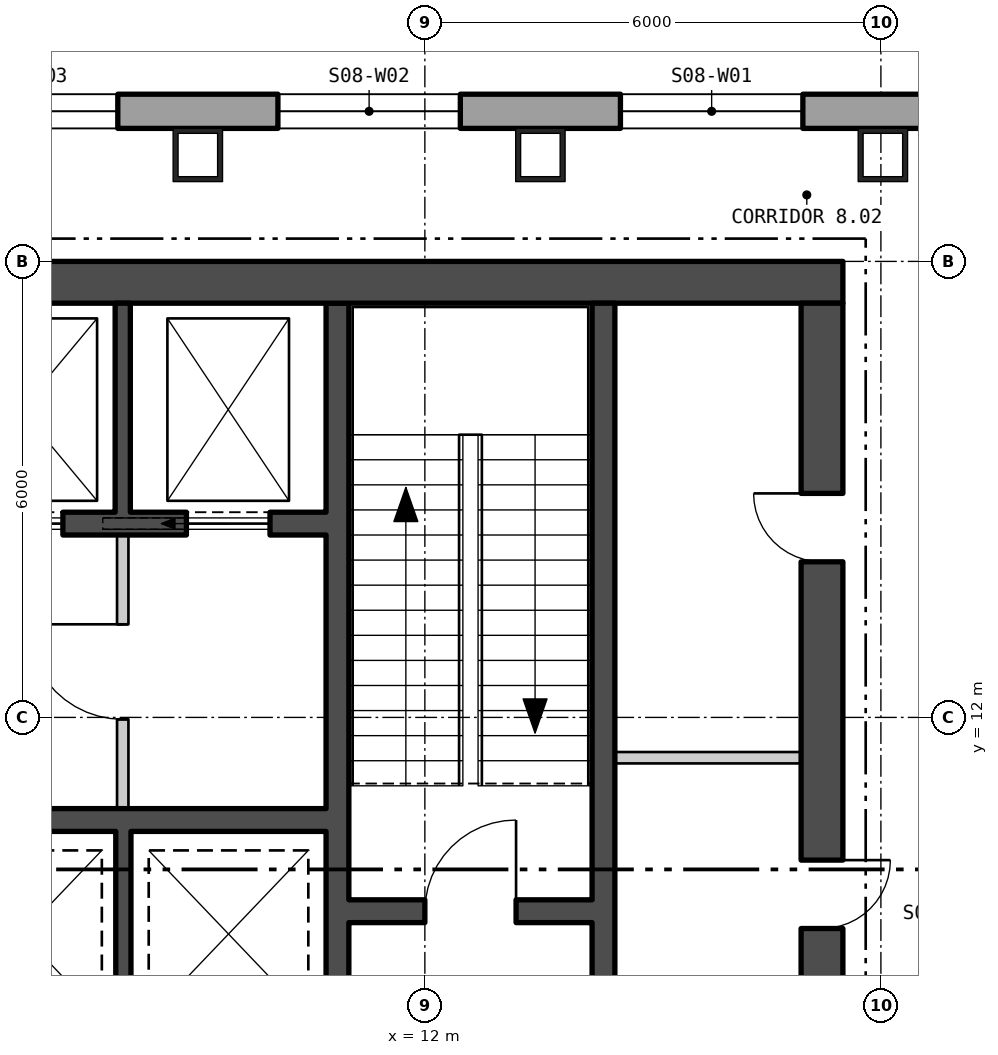
"""IFC4 building model, lengths in metres.
Left out: names, types, materials, properties, quantities, classifications, styles, units other than length and angle.
Written with IfcOpenShell. Run it as: python <this file> out.ifc"""

import sys

from ifc_helpers import new_model, si_unit, direction, frame, frame_2d, origin, origin_2d, place, context, subcontext, project, spatial, polyline, rectangle, hollow_rectangle, outline, extrude, element, fill, save


model = new_model("IFC4")
c1 = context("Model", 3, precision=1e-05, world=origin(), true_north=direction((0.0, 1.0)))
c2 = subcontext(c1, "Body", "Model", "MODEL_VIEW")
j1 = project(units=[si_unit("LENGTHUNIT", "METRE"), si_unit("PLANEANGLEUNIT", "RADIAN")], contexts=[c1])
p1 = place(None, origin())
s1 = spatial("IfcSite", under=j1, at=p1, CompositionType="ELEMENT")
p2 = place(p1, origin())
s2 = spatial("IfcBuilding", under=s1, at=p2, CompositionType="ELEMENT")
p3 = place(p2, frame((0.0, 0.0, 111.3)))
s3 = spatial("IfcBuildingStorey", under=s2, at=p3, CompositionType="ELEMENT", Elevation=111.3)
for number, where, z_axis, x_axis in (
    (1, (18.026, 19.4, 0.0), (0.0, 0.0, 1.0), (-1.0, 0.0, 0.0)),
    (2, (13.52, 19.4, 0.0), (0.0, 0.0, 1.0), (-1.0, 0.0, 0.0)),
    (3, (9.013, 19.4, 0.0), (0.0, 0.0, 1.0), (-1.0, 0.0, 0.0)),
):
    element("IfcColumn", number, at=place(p3, frame(where, z_axis=z_axis, x_axis=x_axis)), inside=s3, PredefinedType="COLUMN", context=c2, shape_type="SweptSolid", body=[
        extrude(hollow_rectangle(XDim=0.65, YDim=0.7, WallThickness=0.065, at=origin_2d()), origin(), (0.0, 0.0, 1.0), 4.5),
    ])
p4 = place(p3, frame((22.865, 19.975, -0.4), z_axis=(0.0, 0.0, 1.0), x_axis=(-1.0, 0.0, 0.0)))
e4 = element("IfcWall", 4, at=p4, inside=s3, PredefinedType="SOLIDWALL", context=c2, shape_type="SweptSolid", body=[
    extrude(outline(polyline([(-0.13, -0.225), (45.86, -0.225), (45.6, 0.225), (0.13, 0.225), (-0.13, -0.225)])), origin(), (0.0, 0.0, 1.0), 4.5),
])
p5 = place(p4, frame((5.892, 0.0, 1.3)))
e5 = element("IfcOpeningElement", 5, at=p5, cuts=e4, PredefinedType="OPENING", context=c2, shape_type="SweptSolid", body=[
    extrude(rectangle(XDim=2.4, YDim=2.6, at=frame_2d((1.2, 1.3))), frame((0.0, 0.235, 0.0), z_axis=(0.0, -1.0, 0.0), x_axis=(1.0, 0.0, 0.0)), (0.0, 0.0, 1.0), 0.47),
])
p6 = place(p4, frame((10.399, 0.0, 1.3)))
e6 = element("IfcOpeningElement", 6, at=p6, cuts=e4, PredefinedType="OPENING", context=c2, shape_type="SweptSolid", body=[
    extrude(rectangle(XDim=2.4, YDim=2.6, at=frame_2d((1.2, 1.3))), frame((0.0, 0.235, 0.0), z_axis=(0.0, -1.0, 0.0), x_axis=(1.0, 0.0, 0.0)), (0.0, 0.0, 1.0), 0.47),
])
p7 = place(p4, frame((14.905, 0.0, 1.3)))
e7 = element("IfcOpeningElement", 7, at=p7, cuts=e4, PredefinedType="OPENING", context=c2, shape_type="SweptSolid", body=[
    extrude(rectangle(XDim=2.4, YDim=2.6, at=frame_2d((1.2, 1.3))), frame((0.0, 0.235, 0.0), z_axis=(0.0, -1.0, 0.0), x_axis=(1.0, 0.0, 0.0)), (0.0, 0.0, 1.0), 0.47),
])
p8 = place(p4, frame((19.412, 0.0, 1.3)))
e8 = element("IfcOpeningElement", 8, at=p8, cuts=e4, PredefinedType="OPENING", context=c2, shape_type="SweptSolid", body=[
    extrude(rectangle(XDim=2.4, YDim=2.6, at=frame_2d((1.2, 1.3))), frame((0.0, 0.235, 0.0), z_axis=(0.0, -1.0, 0.0), x_axis=(1.0, 0.0, 0.0)), (0.0, 0.0, 1.0), 0.47),
])
p9 = place(p4, frame((23.918, 0.0, 1.3)))
e9 = element("IfcOpeningElement", 9, at=p9, cuts=e4, PredefinedType="OPENING", context=c2, shape_type="SweptSolid", body=[
    extrude(rectangle(XDim=2.4, YDim=2.6, at=frame_2d((1.2, 1.3))), frame((0.0, 0.235, 0.0), z_axis=(0.0, -1.0, 0.0), x_axis=(1.0, 0.0, 0.0)), (0.0, 0.0, 1.0), 0.47),
])
p10 = place(p4, frame((28.425, 0.0, 1.3)))
e10 = element("IfcOpeningElement", 10, at=p10, cuts=e4, PredefinedType="OPENING", context=c2, shape_type="SweptSolid", body=[
    extrude(rectangle(XDim=2.4, YDim=2.6, at=frame_2d((1.2, 1.3))), frame((0.0, 0.235, 0.0), z_axis=(0.0, -1.0, 0.0), x_axis=(1.0, 0.0, 0.0)), (0.0, 0.0, 1.0), 0.47),
])
p11 = place(p4, frame((32.932, 0.0, 1.3)))
e11 = element("IfcOpeningElement", 11, at=p11, cuts=e4, PredefinedType="OPENING", context=c2, shape_type="SweptSolid", body=[
    extrude(rectangle(XDim=2.4, YDim=2.6, at=frame_2d((1.2, 1.3))), frame((0.0, 0.235, 0.0), z_axis=(0.0, -1.0, 0.0), x_axis=(1.0, 0.0, 0.0)), (0.0, 0.0, 1.0), 0.47),
])
p12 = place(p4, frame((37.438, 0.0, 1.3)))
e12 = element("IfcOpeningElement", 12, at=p12, cuts=e4, PredefinedType="OPENING", context=c2, shape_type="SweptSolid", body=[
    extrude(rectangle(XDim=2.4, YDim=2.6, at=frame_2d((1.2, 1.3))), frame((0.0, 0.235, 0.0), z_axis=(0.0, -1.0, 0.0), x_axis=(1.0, 0.0, 0.0)), (0.0, 0.0, 1.0), 0.47),
])
p13 = place(p3, frame((4.73, -27.821, -0.18), z_axis=(0.0, 0.0, 1.0), x_axis=(0.500000141277, 0.866025322218, 0.0)))
e13 = element("IfcWall", 13, at=p13, inside=s3, PredefinedType="SOLIDWALL", context=c2, shape_type="SweptSolid", body=[
    extrude(outline(polyline([(-0.13, -0.225), (45.86, -0.225), (45.6, 0.225), (0.13, 0.225), (-0.13, -0.225)])), origin(), (0.0, 0.0, 1.0), 4.28),
])
p14 = place(p13, frame((1.424, 0.0, 1.08)))
e14 = element("IfcOpeningElement", 14, at=p14, cuts=e13, PredefinedType="OPENING", context=c2, shape_type="SweptSolid", body=[
    extrude(rectangle(XDim=2.4, YDim=2.6, at=frame_2d((1.2, 1.3))), frame((0.0, 0.235, 0.0), z_axis=(0.0, -1.0, 0.0), x_axis=(1.0, 0.0, 0.0)), (0.0, 0.0, 1.0), 0.47),
])
p15 = place(p13, frame((5.892, 0.0, 1.08)))
e15 = element("IfcOpeningElement", 15, at=p15, cuts=e13, PredefinedType="OPENING", context=c2, shape_type="SweptSolid", body=[
    extrude(rectangle(XDim=2.4, YDim=2.6, at=frame_2d((1.2, 1.3))), frame((0.0, 0.235, 0.0), z_axis=(0.0, -1.0, 0.0), x_axis=(1.0, 0.0, 0.0)), (0.0, 0.0, 1.0), 0.47),
])
p16 = place(p13, frame((10.399, 0.0, 1.08)))
e16 = element("IfcOpeningElement", 16, at=p16, cuts=e13, PredefinedType="OPENING", context=c2, shape_type="SweptSolid", body=[
    extrude(rectangle(XDim=2.4, YDim=2.6, at=frame_2d((1.2, 1.3))), frame((0.0, 0.235, 0.0), z_axis=(0.0, -1.0, 0.0), x_axis=(1.0, 0.0, 0.0)), (0.0, 0.0, 1.0), 0.47),
])
p17 = place(p13, frame((14.905, 0.0, 1.08)))
e17 = element("IfcOpeningElement", 17, at=p17, cuts=e13, PredefinedType="OPENING", context=c2, shape_type="SweptSolid", body=[
    extrude(rectangle(XDim=2.4, YDim=2.6, at=frame_2d((1.2, 1.3))), frame((0.0, 0.235, 0.0), z_axis=(0.0, -1.0, 0.0), x_axis=(1.0, 0.0, 0.0)), (0.0, 0.0, 1.0), 0.47),
])
p18 = place(p13, frame((19.412, 0.0, 1.08)))
e18 = element("IfcOpeningElement", 18, at=p18, cuts=e13, PredefinedType="OPENING", context=c2, shape_type="SweptSolid", body=[
    extrude(rectangle(XDim=2.4, YDim=2.6, at=frame_2d((1.2, 1.3))), frame((0.0, 0.235, 0.0), z_axis=(0.0, -1.0, 0.0), x_axis=(1.0, 0.0, 0.0)), (0.0, 0.0, 1.0), 0.47),
])
p19 = place(p13, frame((23.918, 0.0, 1.08)))
e19 = element("IfcOpeningElement", 19, at=p19, cuts=e13, PredefinedType="OPENING", context=c2, shape_type="SweptSolid", body=[
    extrude(rectangle(XDim=2.4, YDim=2.6, at=frame_2d((1.2, 1.3))), frame((0.0, 0.235, 0.0), z_axis=(0.0, -1.0, 0.0), x_axis=(1.0, 0.0, 0.0)), (0.0, 0.0, 1.0), 0.47),
])
p20 = place(p13, frame((28.425, 0.0, 1.08)))
e20 = element("IfcOpeningElement", 20, at=p20, cuts=e13, PredefinedType="OPENING", context=c2, shape_type="SweptSolid", body=[
    extrude(rectangle(XDim=2.4, YDim=2.6, at=frame_2d((1.2, 1.3))), frame((0.0, 0.235, 0.0), z_axis=(0.0, -1.0, 0.0), x_axis=(1.0, 0.0, 0.0)), (0.0, 0.0, 1.0), 0.47),
])
p21 = place(p13, frame((32.932, 0.0, 1.08)))
e21 = element("IfcOpeningElement", 21, at=p21, cuts=e13, PredefinedType="OPENING", context=c2, shape_type="SweptSolid", body=[
    extrude(rectangle(XDim=2.4, YDim=2.6, at=frame_2d((1.2, 1.3))), frame((0.0, 0.235, 0.0), z_axis=(0.0, -1.0, 0.0), x_axis=(1.0, 0.0, 0.0)), (0.0, 0.0, 1.0), 0.47),
])
p22 = place(p13, frame((37.438, 0.0, 1.08)))
e22 = element("IfcOpeningElement", 22, at=p22, cuts=e13, PredefinedType="OPENING", context=c2, shape_type="SweptSolid", body=[
    extrude(rectangle(XDim=2.4, YDim=2.6, at=frame_2d((1.2, 1.3))), frame((0.0, 0.235, 0.0), z_axis=(0.0, -1.0, 0.0), x_axis=(1.0, 0.0, 0.0)), (0.0, 0.0, 1.0), 0.47),
])
p23 = place(p13, frame((41.907, 0.0, 1.08)))
e23 = element("IfcOpeningElement", 23, at=p23, cuts=e13, PredefinedType="OPENING", context=c2, shape_type="SweptSolid", body=[
    extrude(rectangle(XDim=2.4, YDim=2.6, at=frame_2d((1.2, 1.3))), frame((0.0, 0.235, 0.0), z_axis=(0.0, -1.0, 0.0), x_axis=(1.0, 0.0, 0.0)), (0.0, 0.0, 1.0), 0.47),
])
p24 = place(p3, frame((-17.5, 17.725, 0.0), z_axis=(0.0, 0.0, 1.0), x_axis=(1.0, 0.0, 0.0)))
e24 = element("IfcWall", 24, at=p24, inside=s3, PredefinedType="SHEAR", context=c2, shape_type="SweptSolid", body=[
    extrude(rectangle(XDim=35.0, YDim=0.55, at=frame_2d((17.5, 0.0))), origin(), (0.0, 0.0, 1.0), 4.3),
])
p25 = place(p3, frame((17.225, 0.55, 0.0), z_axis=(0.0, 0.0, 1.0), x_axis=(0.0, 1.0, 0.0)))
e25 = element("IfcWall", 25, at=p25, inside=s3, PredefinedType="SHEAR", context=c2, shape_type="SweptSolid", body=[
    extrude(rectangle(XDim=16.9, YDim=0.55, at=frame_2d((8.45, 0.0))), origin(), (0.0, 0.0, 1.0), 4.3),
])
p26 = place(p25, frame((5.75, 0.0, 0.0)))
e26 = element("IfcOpeningElement", 26, at=p26, cuts=e25, PredefinedType="OPENING", context=c2, shape_type="SweptSolid", body=[
    extrude(rectangle(XDim=1.5, YDim=2.1, at=frame_2d((0.75, 1.05))), frame((0.0, 0.285, 0.0), z_axis=(0.0, -1.0, 0.0), x_axis=(1.0, 0.0, 0.0)), (0.0, 0.0, 1.0), 0.57),
])
p27 = place(p25, frame((1.525, 0.0, 0.0)))
e27 = element("IfcOpeningElement", 27, at=p27, cuts=e25, PredefinedType="OPENING", context=c2, shape_type="SweptSolid", body=[
    extrude(rectangle(XDim=0.9, YDim=2.1, at=frame_2d((0.45, 1.05))), frame((0.0, 0.285, 0.0), z_axis=(0.0, -1.0, 0.0), x_axis=(1.0, 0.0, 0.0)), (0.0, 0.0, 1.0), 0.57),
])
p28 = place(p25, frame((4.35, 0.0, 0.0)))
e28 = element("IfcOpeningElement", 28, at=p28, cuts=e25, PredefinedType="OPENING", context=c2, shape_type="SweptSolid", body=[
    extrude(rectangle(XDim=1.0, YDim=2.1, at=frame_2d((0.5, 1.05))), frame((0.0, 0.285, 0.0), z_axis=(0.0, -1.0, 0.0), x_axis=(1.0, 0.0, 0.0)), (0.0, 0.0, 1.0), 0.57),
])
p29 = place(p25, frame((8.672, 0.0, 0.0)))
e29 = element("IfcOpeningElement", 29, at=p29, cuts=e25, PredefinedType="OPENING", context=c2, shape_type="SweptSolid", body=[
    extrude(rectangle(XDim=0.9, YDim=2.1, at=frame_2d((0.45, 1.05))), frame((0.0, 0.285, 0.0), z_axis=(0.0, -1.0, 0.0), x_axis=(1.0, 0.0, 0.0)), (0.0, 0.0, 1.0), 0.57),
])
p30 = place(p25, frame((13.497, 0.0, 0.0)))
e30 = element("IfcOpeningElement", 30, at=p30, cuts=e25, PredefinedType="OPENING", context=c2, shape_type="SweptSolid", body=[
    extrude(rectangle(XDim=0.9, YDim=2.1, at=frame_2d((0.45, 1.05))), frame((0.0, 0.285, 0.0), z_axis=(0.0, -1.0, 0.0), x_axis=(1.0, 0.0, 0.0)), (0.0, 0.0, 1.0), 0.57),
])
p31 = place(p3, frame((10.85, 0.55, 0.0), z_axis=(0.0, 0.0, 1.0), x_axis=(0.0, 1.0, 0.0)))
e31 = element("IfcWall", 31, at=p31, inside=s3, PredefinedType="SHEAR", context=c2, shape_type="SweptSolid", body=[
    extrude(rectangle(XDim=16.9, YDim=0.3, at=frame_2d((8.45, 0.0))), origin(), (0.0, 0.0, 1.0), 4.3),
])
p32 = place(p31, frame((5.125, 0.0, 0.0)))
e32 = element("IfcOpeningElement", 32, at=p32, cuts=e31, PredefinedType="OPENING", context=c2, shape_type="SweptSolid", body=[
    extrude(rectangle(XDim=1.25, YDim=2.1, at=frame_2d((0.625, 1.05))), frame((0.0, 0.16, 0.0), z_axis=(0.0, -1.0, 0.0), x_axis=(1.0, 0.0, 0.0)), (0.0, 0.0, 1.0), 0.32),
])
p33 = place(p31, frame((1.55, 0.0, 0.0)))
e33 = element("IfcOpeningElement", 33, at=p33, cuts=e31, PredefinedType="OPENING", context=c2, shape_type="SweptSolid", body=[
    extrude(rectangle(XDim=1.0, YDim=2.1, at=frame_2d((0.5, 1.05))), frame((0.0, 0.16, 0.0), z_axis=(0.0, -1.0, 0.0), x_axis=(1.0, 0.0, 0.0)), (0.0, 0.0, 1.0), 0.32),
])
p34 = place(p3, frame((14.35, 0.55, 0.0), z_axis=(0.0, 0.0, 1.0), x_axis=(0.0, 1.0, 0.0)))
e34 = element("IfcWall", 34, at=p34, inside=s3, PredefinedType="SHEAR", context=c2, shape_type="SweptSolid", body=[
    extrude(rectangle(XDim=16.9, YDim=0.3, at=frame_2d((8.45, 0.0))), origin(), (0.0, 0.0, 1.0), 4.3),
])
p35 = place(p34, frame((5.75, 0.0, 0.0)))
e35 = element("IfcOpeningElement", 35, at=p35, cuts=e34, PredefinedType="OPENING", context=c2, shape_type="SweptSolid", body=[
    extrude(rectangle(XDim=1.5, YDim=2.1, at=frame_2d((0.75, 1.05))), frame((0.0, 0.16, 0.0), z_axis=(0.0, -1.0, 0.0), x_axis=(1.0, 0.0, 0.0)), (0.0, 0.0, 1.0), 0.32),
])
p36 = place(p3, frame((11.0, 9.45, 0.0), z_axis=(0.0, 0.0, 1.0), x_axis=(1.0, 0.0, 0.0)))
e36 = element("IfcWall", 36, at=p36, inside=s3, PredefinedType="SHEAR", context=c2, shape_type="SweptSolid", body=[
    extrude(rectangle(XDim=3.2, YDim=0.3, at=frame_2d((1.6, 0.0))), origin(), (0.0, 0.0, 1.0), 4.3),
])
p37 = place(p36, frame((1.0, 0.0, 0.0)))
e37 = element("IfcOpeningElement", 37, at=p37, cuts=e36, PredefinedType="OPENING", context=c2, shape_type="SweptSolid", body=[
    extrude(rectangle(XDim=1.2, YDim=2.1, at=frame_2d((0.6, 1.05))), frame((0.0, 0.16, 0.0), z_axis=(0.0, -1.0, 0.0), x_axis=(1.0, 0.0, 0.0)), (0.0, 0.0, 1.0), 0.32),
])
p38 = place(p3, frame((-10.7, 14.55, 0.0), z_axis=(0.0, 0.0, 1.0), x_axis=(1.0, 0.0, 0.0)))
e38 = element("IfcWall", 38, at=p38, inside=s3, PredefinedType="SHEAR", context=c2, shape_type="SweptSolid", body=[
    extrude(rectangle(XDim=21.4, YDim=0.3, at=frame_2d((10.7, 0.0))), origin(), (0.0, 0.0, 1.0), 4.3),
])
p39 = place(p38, frame((0.738, 0.0, 0.0)))
e39 = element("IfcOpeningElement", 39, at=p39, cuts=e38, PredefinedType="OPENING", context=c2, shape_type="SweptSolid", body=[
    extrude(rectangle(XDim=1.1, YDim=2.1, at=frame_2d((0.55, 1.05))), frame((0.0, 0.16, 0.0), z_axis=(0.0, -1.0, 0.0), x_axis=(1.0, 0.0, 0.0)), (0.0, 0.0, 1.0), 0.32),
])
p40 = place(p38, frame((3.462, 0.0, 0.0)))
e40 = element("IfcOpeningElement", 40, at=p40, cuts=e38, PredefinedType="OPENING", context=c2, shape_type="SweptSolid", body=[
    extrude(rectangle(XDim=1.1, YDim=2.1, at=frame_2d((0.55, 1.05))), frame((0.0, 0.16, 0.0), z_axis=(0.0, -1.0, 0.0), x_axis=(1.0, 0.0, 0.0)), (0.0, 0.0, 1.0), 0.32),
])
p41 = place(p38, frame((6.138, 0.0, 0.0)))
e41 = element("IfcOpeningElement", 41, at=p41, cuts=e38, PredefinedType="OPENING", context=c2, shape_type="SweptSolid", body=[
    extrude(rectangle(XDim=1.1, YDim=2.1, at=frame_2d((0.55, 1.05))), frame((0.0, 0.16, 0.0), z_axis=(0.0, -1.0, 0.0), x_axis=(1.0, 0.0, 0.0)), (0.0, 0.0, 1.0), 0.32),
])
p42 = place(p38, frame((8.812, 0.0, 0.0)))
e42 = element("IfcOpeningElement", 42, at=p42, cuts=e38, PredefinedType="OPENING", context=c2, shape_type="SweptSolid", body=[
    extrude(rectangle(XDim=1.1, YDim=2.1, at=frame_2d((0.55, 1.05))), frame((0.0, 0.16, 0.0), z_axis=(0.0, -1.0, 0.0), x_axis=(1.0, 0.0, 0.0)), (0.0, 0.0, 1.0), 0.32),
])
p43 = place(p38, frame((14.162, 0.0, 0.0)))
e43 = element("IfcOpeningElement", 43, at=p43, cuts=e38, PredefinedType="OPENING", context=c2, shape_type="SweptSolid", body=[
    extrude(rectangle(XDim=1.1, YDim=2.1, at=frame_2d((0.55, 1.05))), frame((0.0, 0.16, 0.0), z_axis=(0.0, -1.0, 0.0), x_axis=(1.0, 0.0, 0.0)), (0.0, 0.0, 1.0), 0.32),
])
p44 = place(p38, frame((16.837, 0.0, 0.0)))
e44 = element("IfcOpeningElement", 44, at=p44, cuts=e38, PredefinedType="OPENING", context=c2, shape_type="SweptSolid", body=[
    extrude(rectangle(XDim=1.1, YDim=2.1, at=frame_2d((0.55, 1.05))), frame((0.0, 0.16, 0.0), z_axis=(0.0, -1.0, 0.0), x_axis=(1.0, 0.0, 0.0)), (0.0, 0.0, 1.0), 0.32),
])
p45 = place(p38, frame((19.562, 0.0, 0.0)))
e45 = element("IfcOpeningElement", 45, at=p45, cuts=e38, PredefinedType="OPENING", context=c2, shape_type="SweptSolid", body=[
    extrude(rectangle(XDim=1.1, YDim=2.1, at=frame_2d((0.55, 1.05))), frame((0.0, 0.16, 0.0), z_axis=(0.0, -1.0, 0.0), x_axis=(1.0, 0.0, 0.0)), (0.0, 0.0, 1.0), 0.32),
])
p46 = place(p3, frame((2.6, 10.65, 0.0), z_axis=(0.0, 0.0, 1.0), x_axis=(1.0, 0.0, 0.0)))
e46 = element("IfcWall", 46, at=p46, inside=s3, PredefinedType="SHEAR", context=c2, shape_type="SweptSolid", body=[
    extrude(rectangle(XDim=8.1, YDim=0.3, at=frame_2d((4.05, 0.0))), origin(), (0.0, 0.0, 1.0), 4.3),
])
p47 = place(p3, frame((8.025, 14.7, 0.0), z_axis=(0.0, 0.0, 1.0), x_axis=(0.0, 1.0, 0.0)))
e47 = element("IfcWall", 47, at=p47, inside=s3, PredefinedType="SHEAR", context=c2, shape_type="SweptSolid", body=[
    extrude(rectangle(XDim=2.75, YDim=0.2, at=frame_2d((1.375, 0.0))), origin(), (0.0, 0.0, 1.0), 4.3),
])
p48 = place(p3, frame((8.033, 7.8, 0.0), z_axis=(0.0, 0.0, 1.0), x_axis=(0.0, 1.0, 0.0)))
e48 = element("IfcWall", 48, at=p48, inside=s3, PredefinedType="SHEAR", context=c2, shape_type="SweptSolid", body=[
    extrude(rectangle(XDim=2.7, YDim=0.2, at=frame_2d((1.35, 0.0))), origin(), (0.0, 0.0, 1.0), 4.3),
])
p49 = place(p3, frame((8.025, 10.8, 0.0), z_axis=(0.0, 0.0, 1.0), x_axis=(0.0, 1.0, 0.0)))
e49 = element("IfcWall", 49, at=p49, inside=s3, PredefinedType="PARTITIONING", context=c2, shape_type="SweptSolid", body=[
    extrude(rectangle(XDim=3.6, YDim=0.15, at=frame_2d((1.8, 0.0))), origin(), (0.0, 0.0, 1.0), 4.3),
])
p50 = place(p49, frame((1.175, 0.0, 0.0)))
e50 = element("IfcOpeningElement", 50, at=p50, cuts=e49, PredefinedType="OPENING", context=c2, shape_type="SweptSolid", body=[
    extrude(rectangle(XDim=1.25, YDim=2.1, at=frame_2d((0.625, 1.05))), frame((0.0, 0.085, 0.0), z_axis=(0.0, -1.0, 0.0), x_axis=(1.0, 0.0, 0.0)), (0.0, 0.0, 1.0), 0.17),
])
p51 = place(p3, frame((14.5, 11.47, 0.0), z_axis=(0.0, 0.0, 1.0), x_axis=(1.0, 0.0, 0.0)))
e51 = element("IfcWall", 51, at=p51, inside=s3, PredefinedType="PARTITIONING", context=c2, shape_type="SweptSolid", body=[
    extrude(rectangle(XDim=2.45, YDim=0.15, at=frame_2d((1.225, 0.0))), origin(), (0.0, 0.0, 1.0), 4.3),
])
p52 = place(p5, origin())
e52 = element("IfcWindow", 52, at=p52, inside=s3, PartitioningType="SINGLE_PANEL", PredefinedType="WINDOW", context=c2, shape_type="SweptSolid", body=[
    extrude(rectangle(XDim=2.4, YDim=2.6, at=frame_2d((1.2, 1.3))), frame((0.0, 0.105, 0.0), z_axis=(0.0, -1.0, 0.0), x_axis=(1.0, 0.0, 0.0)), (0.0, 0.0, 1.0), 0.06),
])
fill(e5, e52)
p53 = place(p6, origin())
e53 = element("IfcWindow", 53, at=p53, inside=s3, PartitioningType="SINGLE_PANEL", PredefinedType="WINDOW", context=c2, shape_type="SweptSolid", body=[
    extrude(rectangle(XDim=2.4, YDim=2.6, at=frame_2d((1.2, 1.3))), frame((0.0, 0.105, 0.0), z_axis=(0.0, -1.0, 0.0), x_axis=(1.0, 0.0, 0.0)), (0.0, 0.0, 1.0), 0.06),
])
fill(e6, e53)
p54 = place(p7, origin())
e54 = element("IfcWindow", 54, at=p54, inside=s3, PartitioningType="SINGLE_PANEL", PredefinedType="WINDOW", context=c2, shape_type="SweptSolid", body=[
    extrude(rectangle(XDim=2.4, YDim=2.6, at=frame_2d((1.2, 1.3))), frame((0.0, 0.105, 0.0), z_axis=(0.0, -1.0, 0.0), x_axis=(1.0, 0.0, 0.0)), (0.0, 0.0, 1.0), 0.06),
])
fill(e7, e54)
p55 = place(p44, origin())
e55 = element("IfcDoor", 55, at=p55, inside=s3, OperationType="SLIDING_TO_LEFT", PredefinedType="DOOR", context=c2, shape_type="SweptSolid", body=[
    extrude(rectangle(XDim=1.1, YDim=2.1, at=frame_2d((0.55, 1.05))), frame((0.0, 0.025, 0.0), z_axis=(0.0, -1.0, 0.0), x_axis=(1.0, 0.0, 0.0)), (0.0, 0.0, 1.0), 0.05),
])
fill(e44, e55)
p56 = place(p45, origin())
e56 = element("IfcDoor", 56, at=p56, inside=s3, OperationType="SLIDING_TO_LEFT", PredefinedType="DOOR", context=c2, shape_type="SweptSolid", body=[
    extrude(rectangle(XDim=1.1, YDim=2.1, at=frame_2d((0.55, 1.05))), frame((0.0, 0.025, 0.0), z_axis=(0.0, -1.0, 0.0), x_axis=(1.0, 0.0, 0.0)), (0.0, 0.0, 1.0), 0.05),
])
fill(e45, e56)
p57 = place(p50, origin())
e57 = element("IfcDoor", 57, at=p57, inside=s3, OperationType="SINGLE_SWING_LEFT", PredefinedType="DOOR", context=c2, shape_type="SweptSolid", body=[
    extrude(rectangle(XDim=1.25, YDim=2.1, at=frame_2d((0.625, 1.05))), frame((0.0, 0.025, 0.0), z_axis=(0.0, -1.0, 0.0), x_axis=(1.0, 0.0, 0.0)), (0.0, 0.0, 1.0), 0.05),
])
fill(e50, e57)
p58 = place(p37, origin())
e58 = element("IfcDoor", 58, at=p58, inside=s3, OperationType="SINGLE_SWING_LEFT", PredefinedType="DOOR", context=c2, shape_type="SweptSolid", body=[
    extrude(rectangle(XDim=1.2, YDim=2.1, at=frame_2d((0.6, 1.05))), frame((0.0, 0.025, 0.0), z_axis=(0.0, -1.0, 0.0), x_axis=(1.0, 0.0, 0.0)), (0.0, 0.0, 1.0), 0.05),
])
fill(e37, e58)
p59 = place(p29, origin())
e59 = element("IfcDoor", 59, at=p59, inside=s3, OperationType="SINGLE_SWING_RIGHT", PredefinedType="DOOR", context=c2, shape_type="SweptSolid", body=[
    extrude(rectangle(XDim=0.9, YDim=2.1, at=frame_2d((0.45, 1.05))), frame((0.0, 0.025, 0.0), z_axis=(0.0, -1.0, 0.0), x_axis=(1.0, 0.0, 0.0)), (0.0, 0.0, 1.0), 0.05),
])
fill(e29, e59)
p60 = place(p30, origin())
e60 = element("IfcDoor", 60, at=p60, inside=s3, OperationType="SINGLE_SWING_LEFT", PredefinedType="DOOR", context=c2, shape_type="SweptSolid", body=[
    extrude(rectangle(XDim=0.9, YDim=2.1, at=frame_2d((0.45, 1.05))), frame((0.0, 0.025, 0.0), z_axis=(0.0, -1.0, 0.0), x_axis=(1.0, 0.0, 0.0)), (0.0, 0.0, 1.0), 0.05),
])
fill(e30, e60)
save(model, sys.argv[1])
